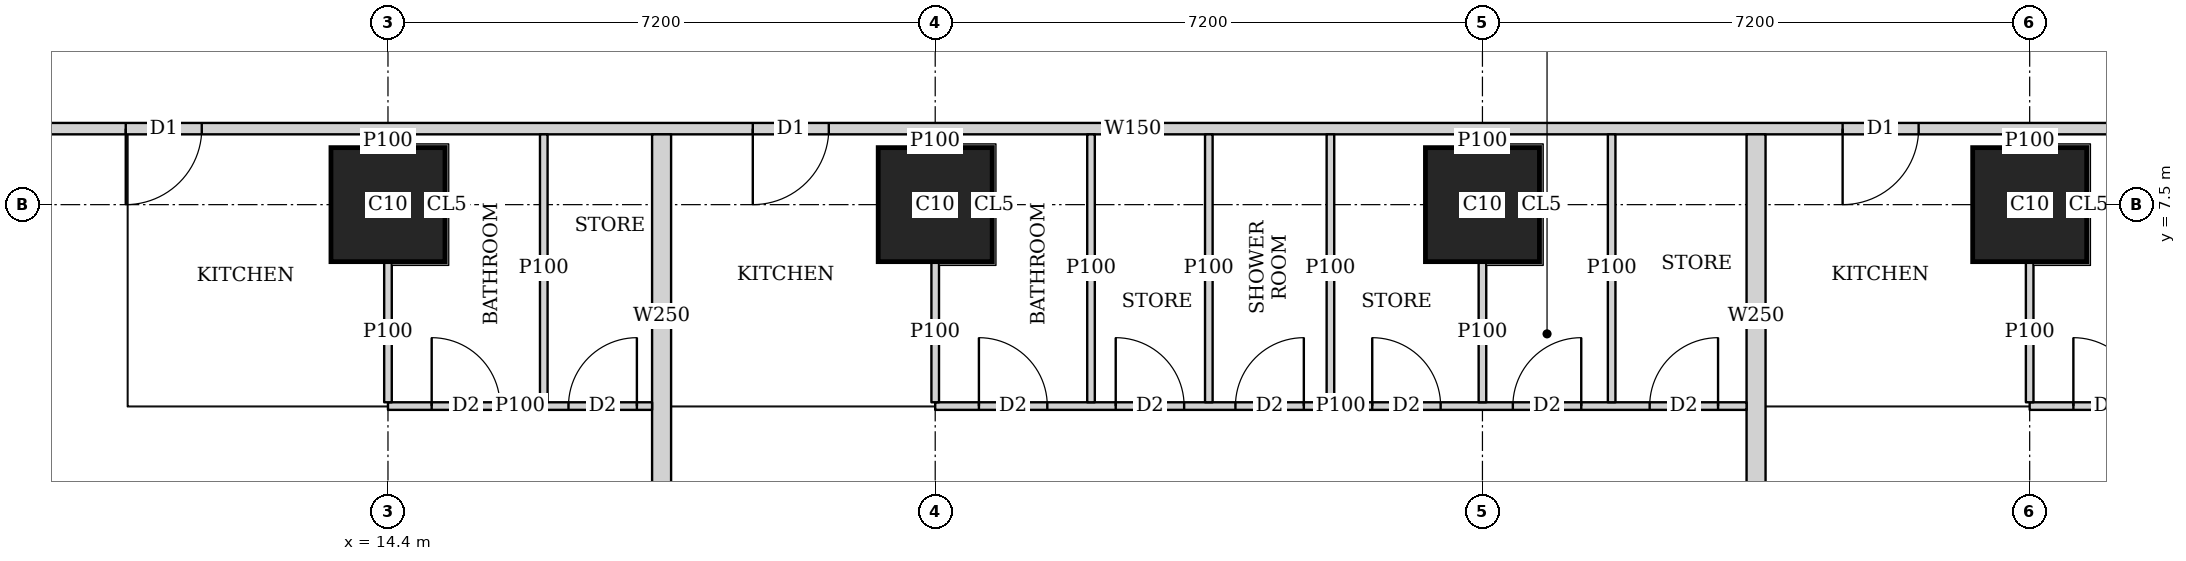
"""IFC4 building model, lengths in metres.
Left out: names, types, materials, properties, quantities, classifications, styles, units other than length and angle.
Written with IfcOpenShell. Run it as: python <this file> out.ifc"""

import sys

from ifc_helpers import new_model, si_unit, direction, frame, frame_2d, origin, origin_2d, place, context, subcontext, project, spatial, rectangle, extrude, element, fill, save


model = new_model("IFC4")
c1 = context("Model", 3, precision=1e-05, world=origin(), true_north=direction((0.0, 1.0)))
c2 = subcontext(c1, "Body", "Model", "MODEL_VIEW")
j1 = project(units=[si_unit("LENGTHUNIT", "METRE"), si_unit("PLANEANGLEUNIT", "RADIAN")], contexts=[c1])
p1 = place(None, origin())
s1 = spatial("IfcSite", under=j1, at=p1, CompositionType="ELEMENT")
p2 = place(p1, origin())
s2 = spatial("IfcBuilding", under=s1, at=p2, CompositionType="ELEMENT")
p3 = place(p2, frame((0.0, 0.0, 139.55)))
s3 = spatial("IfcBuildingStorey", under=s2, at=p3, CompositionType="ELEMENT", Elevation=139.55)
for number, where, z_axis, x_axis in (
    (1, (14.4, 7.5, 0.0), (0.0, 0.0, 1.0), (1.0, 0.0, 0.0)),
    (2, (21.6, 7.5, 0.0), (0.0, 0.0, 1.0), (1.0, 0.0, 0.0)),
    (3, (28.8, 7.5, 0.0), (0.0, 0.0, 1.0), (1.0, 0.0, 0.0)),
    (4, (36.0, 7.5, 0.0), (0.0, 0.0, 1.0), (1.0, 0.0, 0.0)),
):
    element("IfcColumn", number, at=place(p3, frame(where, z_axis=z_axis, x_axis=x_axis)), inside=s3, PredefinedType="COLUMN", context=c2, shape_type="SweptSolid", body=[
        extrude(rectangle(XDim=1.5, YDim=1.5, at=origin_2d()), origin(), (0.0, 0.0, 1.0), 3.75),
    ])
p4 = place(p3, frame((40.053, 8.5, 0.0), z_axis=(0.0, 0.0, 1.0), x_axis=(-1.0, 0.0, 0.0)))
e5 = element("IfcWall", 5, at=p4, inside=s3, PredefinedType="SOLIDWALL", context=c2, shape_type="SweptSolid", body=[
    extrude(rectangle(XDim=31.703, YDim=0.15, at=frame_2d((15.852, 0.0))), origin(), (0.0, 0.0, 1.0), 3.5),
])
p5 = place(p4, frame((28.103, 0.0, 0.0)))
e6 = element("IfcOpeningElement", 6, at=p5, cuts=e5, PredefinedType="OPENING", context=c2, shape_type="SweptSolid", body=[
    extrude(rectangle(XDim=1.0, YDim=2.1, at=frame_2d((0.5, 1.05))), frame((0.0, 0.085, 0.0), z_axis=(0.0, -1.0, 0.0), x_axis=(1.0, 0.0, 0.0)), (0.0, 0.0, 1.0), 0.17),
])
p6 = place(p4, frame((19.853, 0.0, 0.0)))
e7 = element("IfcOpeningElement", 7, at=p6, cuts=e5, PredefinedType="OPENING", context=c2, shape_type="SweptSolid", body=[
    extrude(rectangle(XDim=1.0, YDim=2.1, at=frame_2d((0.5, 1.05))), frame((0.0, 0.085, 0.0), z_axis=(0.0, -1.0, 0.0), x_axis=(1.0, 0.0, 0.0)), (0.0, 0.0, 1.0), 0.17),
])
p7 = place(p4, frame((5.514, 0.0, 0.0)))
e8 = element("IfcOpeningElement", 8, at=p7, cuts=e5, PredefinedType="OPENING", context=c2, shape_type="SweptSolid", body=[
    extrude(rectangle(XDim=1.0, YDim=2.1, at=frame_2d((0.5, 1.05))), frame((0.0, 0.085, 0.0), z_axis=(0.0, -1.0, 0.0), x_axis=(1.0, 0.0, 0.0)), (0.0, 0.0, 1.0), 0.17),
])
p8 = place(p3, frame((33.623, 43.022, 0.0), z_axis=(0.0, 0.0, 1.0), x_axis=(0.185596841028, -0.98262597798, 0.0)))
e9 = element("IfcWall", 9, at=p8, inside=s3, PredefinedType="SOLIDWALL", context=c2, shape_type="SweptSolid", body=[
    extrude(rectangle(XDim=41.66, YDim=0.15, at=frame_2d((20.83, 0.0))), origin(), (0.0, 0.0, 1.0), 2.5),
])
p9 = place(p8, frame((20.242, 0.0, 0.0)))
e10 = element("IfcOpeningElement", 10, at=p9, cuts=e9, PredefinedType="OPENING", context=c2, shape_type="SweptSolid", body=[
    extrude(rectangle(XDim=1.0, YDim=2.1, at=frame_2d((0.5, 1.05))), frame((0.0, 0.085, 0.0), z_axis=(0.0, -1.0, 0.0), x_axis=(1.0, 0.0, 0.0)), (0.0, 0.0, 1.0), 0.17),
])
p10 = place(p8, frame((24.714, 0.0, 0.0)))
e11 = element("IfcOpeningElement", 11, at=p10, cuts=e9, PredefinedType="OPENING", context=c2, shape_type="SweptSolid", body=[
    extrude(rectangle(XDim=1.0, YDim=2.1, at=frame_2d((0.5, 1.05))), frame((0.0, 0.085, 0.0), z_axis=(0.0, -1.0, 0.0), x_axis=(1.0, 0.0, 0.0)), (0.0, 0.0, 1.0), 0.17),
])
p11 = place(p8, frame((31.206, 0.0, 0.0)))
e12 = element("IfcOpeningElement", 12, at=p11, cuts=e9, PredefinedType="OPENING", context=c2, shape_type="SweptSolid", body=[
    extrude(rectangle(XDim=1.0, YDim=2.1, at=frame_2d((0.5, 1.05))), frame((0.0, 0.085, 0.0), z_axis=(0.0, -1.0, 0.0), x_axis=(1.0, 0.0, 0.0)), (0.0, 0.0, 1.0), 0.17),
])
p12 = place(p3, frame((17.875, 4.85, 0.0), z_axis=(0.0, 0.0, 1.0), x_axis=(-1.0, 0.0, 0.0)))
e13 = element("IfcWall", 13, at=p12, inside=s3, PredefinedType="PARTITIONING", context=c2, shape_type="SweptSolid", body=[
    extrude(rectangle(XDim=3.475, YDim=0.1, at=frame_2d((1.738, 0.0))), origin(), (0.0, 0.0, 1.0), 3.5),
])
p13 = place(p12, frame((2.0, 0.0, 0.0)))
e14 = element("IfcOpeningElement", 14, at=p13, cuts=e13, PredefinedType="OPENING", context=c2, shape_type="SweptSolid", body=[
    extrude(rectangle(XDim=0.9, YDim=2.1, at=frame_2d((0.45, 1.05))), frame((0.0, 0.06, 0.0), z_axis=(0.0, -1.0, 0.0), x_axis=(1.0, 0.0, 0.0)), (0.0, 0.0, 1.0), 0.12),
])
p14 = place(p12, frame((0.2, 0.0, 0.0)))
e15 = element("IfcOpeningElement", 15, at=p14, cuts=e13, PredefinedType="OPENING", context=c2, shape_type="SweptSolid", body=[
    extrude(rectangle(XDim=0.9, YDim=2.1, at=frame_2d((0.45, 1.05))), frame((0.0, 0.06, 0.0), z_axis=(0.0, -1.0, 0.0), x_axis=(1.0, 0.0, 0.0)), (0.0, 0.0, 1.0), 0.12),
])
p15 = place(p3, frame((14.4, 4.9, 0.0), z_axis=(0.0, 0.0, 1.0), x_axis=(0.0, 1.0, 0.0)))
e16 = element("IfcWall", 16, at=p15, inside=s3, PredefinedType="PARTITIONING", context=c2, shape_type="SweptSolid", body=[
    extrude(rectangle(XDim=1.849, YDim=0.1, at=frame_2d((0.925, 0.0))), origin(), (0.0, 0.0, 1.0), 3.5),
])
p16 = place(p3, frame((14.4, 8.251, 0.0), z_axis=(0.0, 0.0, 1.0), x_axis=(0.0, 1.0, 0.0)))
e17 = element("IfcWall", 17, at=p16, inside=s3, PredefinedType="PARTITIONING", context=c2, shape_type="SweptSolid", body=[
    extrude(rectangle(XDim=0.174, YDim=0.1, at=frame_2d((0.087, 0.0))), origin(), (0.0, 0.0, 1.0), 3.5),
])
p17 = place(p3, frame((16.45, 4.9, 0.0), z_axis=(0.0, 0.0, 1.0), x_axis=(0.0, 1.0, 0.0)))
e18 = element("IfcWall", 18, at=p17, inside=s3, PredefinedType="PARTITIONING", context=c2, shape_type="SweptSolid", body=[
    extrude(rectangle(XDim=3.525, YDim=0.1, at=frame_2d((1.763, 0.0))), origin(), (0.0, 0.0, 1.0), 3.5),
])
p18 = place(p3, frame((32.275, 4.85, 0.0), z_axis=(0.0, 0.0, 1.0), x_axis=(-1.0, 0.0, 0.0)))
e19 = element("IfcWall", 19, at=p18, inside=s3, PredefinedType="PARTITIONING", context=c2, shape_type="SweptSolid", body=[
    extrude(rectangle(XDim=10.675, YDim=0.1, at=frame_2d((5.337, 0.0))), origin(), (0.0, 0.0, 1.0), 3.5),
])
p19 = place(p18, frame((9.2, 0.0, 0.0)))
e20 = element("IfcOpeningElement", 20, at=p19, cuts=e19, PredefinedType="OPENING", context=c2, shape_type="SweptSolid", body=[
    extrude(rectangle(XDim=0.9, YDim=2.1, at=frame_2d((0.45, 1.05))), frame((0.0, 0.06, 0.0), z_axis=(0.0, -1.0, 0.0), x_axis=(1.0, 0.0, 0.0)), (0.0, 0.0, 1.0), 0.12),
])
p20 = place(p18, frame((5.825, 0.0, 0.0)))
e21 = element("IfcOpeningElement", 21, at=p20, cuts=e19, PredefinedType="OPENING", context=c2, shape_type="SweptSolid", body=[
    extrude(rectangle(XDim=0.9, YDim=2.1, at=frame_2d((0.45, 1.05))), frame((0.0, 0.06, 0.0), z_axis=(0.0, -1.0, 0.0), x_axis=(1.0, 0.0, 0.0)), (0.0, 0.0, 1.0), 0.12),
])
p21 = place(p18, frame((2.175, 0.0, 0.0)))
e22 = element("IfcOpeningElement", 22, at=p21, cuts=e19, PredefinedType="OPENING", context=c2, shape_type="SweptSolid", body=[
    extrude(rectangle(XDim=0.9, YDim=2.1, at=frame_2d((0.45, 1.05))), frame((0.0, 0.06, 0.0), z_axis=(0.0, -1.0, 0.0), x_axis=(1.0, 0.0, 0.0)), (0.0, 0.0, 1.0), 0.12),
])
p22 = place(p18, frame((7.4, 0.0, 0.0)))
e23 = element("IfcOpeningElement", 23, at=p22, cuts=e19, PredefinedType="OPENING", context=c2, shape_type="SweptSolid", body=[
    extrude(rectangle(XDim=0.9, YDim=2.1, at=frame_2d((0.45, 1.05))), frame((0.0, 0.06, 0.0), z_axis=(0.0, -1.0, 0.0), x_axis=(1.0, 0.0, 0.0)), (0.0, 0.0, 1.0), 0.12),
])
p23 = place(p18, frame((4.025, 0.0, 0.0)))
e24 = element("IfcOpeningElement", 24, at=p23, cuts=e19, PredefinedType="OPENING", context=c2, shape_type="SweptSolid", body=[
    extrude(rectangle(XDim=0.9, YDim=2.1, at=frame_2d((0.45, 1.05))), frame((0.0, 0.06, 0.0), z_axis=(0.0, -1.0, 0.0), x_axis=(1.0, 0.0, 0.0)), (0.0, 0.0, 1.0), 0.12),
])
p24 = place(p18, frame((0.375, 0.0, 0.0)))
e25 = element("IfcOpeningElement", 25, at=p24, cuts=e19, PredefinedType="OPENING", context=c2, shape_type="SweptSolid", body=[
    extrude(rectangle(XDim=0.9, YDim=2.1, at=frame_2d((0.45, 1.05))), frame((0.0, 0.06, 0.0), z_axis=(0.0, -1.0, 0.0), x_axis=(1.0, 0.0, 0.0)), (0.0, 0.0, 1.0), 0.12),
])
p25 = place(p3, frame((21.6, 4.9, 0.0), z_axis=(0.0, 0.0, 1.0), x_axis=(0.0, 1.0, 0.0)))
e26 = element("IfcWall", 26, at=p25, inside=s3, PredefinedType="PARTITIONING", context=c2, shape_type="SweptSolid", body=[
    extrude(rectangle(XDim=1.849, YDim=0.1, at=frame_2d((0.925, 0.0))), origin(), (0.0, 0.0, 1.0), 3.5),
])
p26 = place(p3, frame((21.6, 8.251, 0.0), z_axis=(0.0, 0.0, 1.0), x_axis=(0.0, 1.0, 0.0)))
e27 = element("IfcWall", 27, at=p26, inside=s3, PredefinedType="PARTITIONING", context=c2, shape_type="SweptSolid", body=[
    extrude(rectangle(XDim=0.174, YDim=0.1, at=frame_2d((0.087, 0.0))), origin(), (0.0, 0.0, 1.0), 3.5),
])
p27 = place(p3, frame((25.2, 4.9, 0.0), z_axis=(0.0, 0.0, 1.0), x_axis=(0.0, 1.0, 0.0)))
e28 = element("IfcWall", 28, at=p27, inside=s3, PredefinedType="PARTITIONING", context=c2, shape_type="SweptSolid", body=[
    extrude(rectangle(XDim=3.525, YDim=0.1, at=frame_2d((1.763, 0.0))), origin(), (0.0, 0.0, 1.0), 3.5),
])
p28 = place(p3, frame((28.8, 4.9, 0.0), z_axis=(0.0, 0.0, 1.0), x_axis=(0.0, 1.0, 0.0)))
e29 = element("IfcWall", 29, at=p28, inside=s3, PredefinedType="PARTITIONING", context=c2, shape_type="SweptSolid", body=[
    extrude(rectangle(XDim=1.849, YDim=0.1, at=frame_2d((0.925, 0.0))), origin(), (0.0, 0.0, 1.0), 3.5),
])
p29 = place(p3, frame((28.8, 8.251, 0.0), z_axis=(0.0, 0.0, 1.0), x_axis=(0.0, 1.0, 0.0)))
e30 = element("IfcWall", 30, at=p29, inside=s3, PredefinedType="PARTITIONING", context=c2, shape_type="SweptSolid", body=[
    extrude(rectangle(XDim=0.174, YDim=0.1, at=frame_2d((0.087, 0.0))), origin(), (0.0, 0.0, 1.0), 3.5),
])
for number, where, z_axis, x_axis in (
    (31, (23.65, 4.9, 0.0), (0.0, 0.0, 1.0), (0.0, 1.0, 0.0)),
    (32, (26.8, 4.9, 0.0), (0.0, 0.0, 1.0), (0.0, 1.0, 0.0)),
    (33, (30.5, 4.9, 0.0), (0.0, 0.0, 1.0), (0.0, 1.0, 0.0)),
):
    element("IfcWall", number, at=place(p3, frame(where, z_axis=z_axis, x_axis=x_axis)), inside=s3, PredefinedType="PARTITIONING", context=c2, shape_type="SweptSolid", body=[
        extrude(rectangle(XDim=3.525, YDim=0.1, at=frame_2d((1.763, 0.0))), origin(), (0.0, 0.0, 1.0), 3.5),
    ])
p30 = place(p3, frame((18.0, 3.65, 0.0), z_axis=(0.0, 0.0, 1.0), x_axis=(0.0, 1.0, 0.0)))
e34 = element("IfcWall", 34, at=p30, inside=s3, PredefinedType="SOLIDWALL", context=c2, shape_type="SweptSolid", body=[
    extrude(rectangle(XDim=4.775, YDim=0.25, at=frame_2d((2.388, 0.0))), origin(), (0.0, 0.0, 1.0), 3.5),
])
p31 = place(p3, frame((40.747, 4.85, 0.0), z_axis=(0.0, 0.0, 1.0), x_axis=(-1.0, 0.0, 0.0)))
e35 = element("IfcWall", 35, at=p31, inside=s3, PredefinedType="PARTITIONING", context=c2, shape_type="SweptSolid", body=[
    extrude(rectangle(XDim=4.747, YDim=0.1, at=frame_2d((2.374, 0.0))), origin(), (0.0, 0.0, 1.0), 3.5),
])
p32 = place(p31, frame((3.272, 0.0, 0.0)))
e36 = element("IfcOpeningElement", 36, at=p32, cuts=e35, PredefinedType="OPENING", context=c2, shape_type="SweptSolid", body=[
    extrude(rectangle(XDim=0.9, YDim=2.1, at=frame_2d((0.45, 1.05))), frame((0.0, 0.06, 0.0), z_axis=(0.0, -1.0, 0.0), x_axis=(1.0, 0.0, 0.0)), (0.0, 0.0, 1.0), 0.12),
])
p33 = place(p31, frame((0.15, 0.0, 0.0)))
e37 = element("IfcOpeningElement", 37, at=p33, cuts=e35, PredefinedType="OPENING", context=c2, shape_type="SweptSolid", body=[
    extrude(rectangle(XDim=0.9, YDim=2.1, at=frame_2d((0.45, 1.05))), frame((0.0, 0.06, 0.0), z_axis=(0.0, -1.0, 0.0), x_axis=(1.0, 0.0, 0.0)), (0.0, 0.0, 1.0), 0.12),
])
p34 = place(p31, frame((1.472, 0.0, 0.0)))
e38 = element("IfcOpeningElement", 38, at=p34, cuts=e35, PredefinedType="OPENING", context=c2, shape_type="SweptSolid", body=[
    extrude(rectangle(XDim=0.9, YDim=2.1, at=frame_2d((0.45, 1.05))), frame((0.0, 0.06, 0.0), z_axis=(0.0, -1.0, 0.0), x_axis=(1.0, 0.0, 0.0)), (0.0, 0.0, 1.0), 0.12),
])
p35 = place(p3, frame((36.0, 4.9, 0.0), z_axis=(0.0, 0.0, 1.0), x_axis=(0.0, 1.0, 0.0)))
e39 = element("IfcWall", 39, at=p35, inside=s3, PredefinedType="PARTITIONING", context=c2, shape_type="SweptSolid", body=[
    extrude(rectangle(XDim=1.849, YDim=0.1, at=frame_2d((0.925, 0.0))), origin(), (0.0, 0.0, 1.0), 3.5),
])
p36 = place(p3, frame((36.0, 8.251, 0.0), z_axis=(0.0, 0.0, 1.0), x_axis=(0.0, 1.0, 0.0)))
e40 = element("IfcWall", 40, at=p36, inside=s3, PredefinedType="PARTITIONING", context=c2, shape_type="SweptSolid", body=[
    extrude(rectangle(XDim=0.174, YDim=0.1, at=frame_2d((0.087, 0.0))), origin(), (0.0, 0.0, 1.0), 3.5),
])
p37 = place(p3, frame((32.4, 3.65, 0.0), z_axis=(0.0, 0.0, 1.0), x_axis=(0.0, 1.0, 0.0)))
e41 = element("IfcWall", 41, at=p37, inside=s3, PredefinedType="SOLIDWALL", context=c2, shape_type="SweptSolid", body=[
    extrude(rectangle(XDim=4.775, YDim=0.25, at=frame_2d((2.388, 0.0))), origin(), (0.0, 0.0, 1.0), 3.5),
])
p38 = place(p13, origin())
e42 = element("IfcDoor", 42, at=p38, inside=s3, OperationType="SINGLE_SWING_LEFT", PredefinedType="DOOR", context=c2, shape_type="SweptSolid", body=[
    extrude(rectangle(XDim=0.9, YDim=2.1, at=frame_2d((0.45, 1.05))), frame((0.0, 0.025, 0.0), z_axis=(0.0, -1.0, 0.0), x_axis=(1.0, 0.0, 0.0)), (0.0, 0.0, 1.0), 0.05),
])
fill(e14, e42)
p39 = place(p14, origin())
e43 = element("IfcDoor", 43, at=p39, inside=s3, OperationType="SINGLE_SWING_RIGHT", PredefinedType="DOOR", context=c2, shape_type="SweptSolid", body=[
    extrude(rectangle(XDim=0.9, YDim=2.1, at=frame_2d((0.45, 1.05))), frame((0.0, 0.025, 0.0), z_axis=(0.0, -1.0, 0.0), x_axis=(1.0, 0.0, 0.0)), (0.0, 0.0, 1.0), 0.05),
])
fill(e15, e43)
p40 = place(p5, origin())
e44 = element("IfcDoor", 44, at=p40, inside=s3, OperationType="SINGLE_SWING_RIGHT", PredefinedType="DOOR", context=c2, shape_type="SweptSolid", body=[
    extrude(rectangle(XDim=1.0, YDim=2.1, at=frame_2d((0.5, 1.05))), frame((0.0, 0.025, 0.0), z_axis=(0.0, -1.0, 0.0), x_axis=(1.0, 0.0, 0.0)), (0.0, 0.0, 1.0), 0.05),
])
fill(e6, e44)
p41 = place(p19, origin())
e45 = element("IfcDoor", 45, at=p41, inside=s3, OperationType="SINGLE_SWING_LEFT", PredefinedType="DOOR", context=c2, shape_type="SweptSolid", body=[
    extrude(rectangle(XDim=0.9, YDim=2.1, at=frame_2d((0.45, 1.05))), frame((0.0, 0.025, 0.0), z_axis=(0.0, -1.0, 0.0), x_axis=(1.0, 0.0, 0.0)), (0.0, 0.0, 1.0), 0.05),
])
fill(e20, e45)
p42 = place(p20, origin())
e46 = element("IfcDoor", 46, at=p42, inside=s3, OperationType="SINGLE_SWING_RIGHT", PredefinedType="DOOR", context=c2, shape_type="SweptSolid", body=[
    extrude(rectangle(XDim=0.9, YDim=2.1, at=frame_2d((0.45, 1.05))), frame((0.0, 0.025, 0.0), z_axis=(0.0, -1.0, 0.0), x_axis=(1.0, 0.0, 0.0)), (0.0, 0.0, 1.0), 0.05),
])
fill(e21, e46)
p43 = place(p21, origin())
e47 = element("IfcDoor", 47, at=p43, inside=s3, OperationType="SINGLE_SWING_RIGHT", PredefinedType="DOOR", context=c2, shape_type="SweptSolid", body=[
    extrude(rectangle(XDim=0.9, YDim=2.1, at=frame_2d((0.45, 1.05))), frame((0.0, 0.025, 0.0), z_axis=(0.0, -1.0, 0.0), x_axis=(1.0, 0.0, 0.0)), (0.0, 0.0, 1.0), 0.05),
])
fill(e22, e47)
p44 = place(p22, origin())
e48 = element("IfcDoor", 48, at=p44, inside=s3, OperationType="SINGLE_SWING_LEFT", PredefinedType="DOOR", context=c2, shape_type="SweptSolid", body=[
    extrude(rectangle(XDim=0.9, YDim=2.1, at=frame_2d((0.45, 1.05))), frame((0.0, 0.025, 0.0), z_axis=(0.0, -1.0, 0.0), x_axis=(1.0, 0.0, 0.0)), (0.0, 0.0, 1.0), 0.05),
])
fill(e23, e48)
p45 = place(p23, origin())
e49 = element("IfcDoor", 49, at=p45, inside=s3, OperationType="SINGLE_SWING_LEFT", PredefinedType="DOOR", context=c2, shape_type="SweptSolid", body=[
    extrude(rectangle(XDim=0.9, YDim=2.1, at=frame_2d((0.45, 1.05))), frame((0.0, 0.025, 0.0), z_axis=(0.0, -1.0, 0.0), x_axis=(1.0, 0.0, 0.0)), (0.0, 0.0, 1.0), 0.05),
])
fill(e24, e49)
p46 = place(p24, origin())
e50 = element("IfcDoor", 50, at=p46, inside=s3, OperationType="SINGLE_SWING_RIGHT", PredefinedType="DOOR", context=c2, shape_type="SweptSolid", body=[
    extrude(rectangle(XDim=0.9, YDim=2.1, at=frame_2d((0.45, 1.05))), frame((0.0, 0.025, 0.0), z_axis=(0.0, -1.0, 0.0), x_axis=(1.0, 0.0, 0.0)), (0.0, 0.0, 1.0), 0.05),
])
fill(e25, e50)
p47 = place(p6, origin())
e51 = element("IfcDoor", 51, at=p47, inside=s3, OperationType="SINGLE_SWING_RIGHT", PredefinedType="DOOR", context=c2, shape_type="SweptSolid", body=[
    extrude(rectangle(XDim=1.0, YDim=2.1, at=frame_2d((0.5, 1.05))), frame((0.0, 0.025, 0.0), z_axis=(0.0, -1.0, 0.0), x_axis=(1.0, 0.0, 0.0)), (0.0, 0.0, 1.0), 0.05),
])
fill(e7, e51)
p48 = place(p32, origin())
e52 = element("IfcDoor", 52, at=p48, inside=s3, OperationType="SINGLE_SWING_LEFT", PredefinedType="DOOR", context=c2, shape_type="SweptSolid", body=[
    extrude(rectangle(XDim=0.9, YDim=2.1, at=frame_2d((0.45, 1.05))), frame((0.0, 0.025, 0.0), z_axis=(0.0, -1.0, 0.0), x_axis=(1.0, 0.0, 0.0)), (0.0, 0.0, 1.0), 0.05),
])
fill(e36, e52)
p49 = place(p7, origin())
e53 = element("IfcDoor", 53, at=p49, inside=s3, OperationType="SINGLE_SWING_RIGHT", PredefinedType="DOOR", context=c2, shape_type="SweptSolid", body=[
    extrude(rectangle(XDim=1.0, YDim=2.1, at=frame_2d((0.5, 1.05))), frame((0.0, 0.025, 0.0), z_axis=(0.0, -1.0, 0.0), x_axis=(1.0, 0.0, 0.0)), (0.0, 0.0, 1.0), 0.05),
])
fill(e8, e53)
save(model, sys.argv[1])
